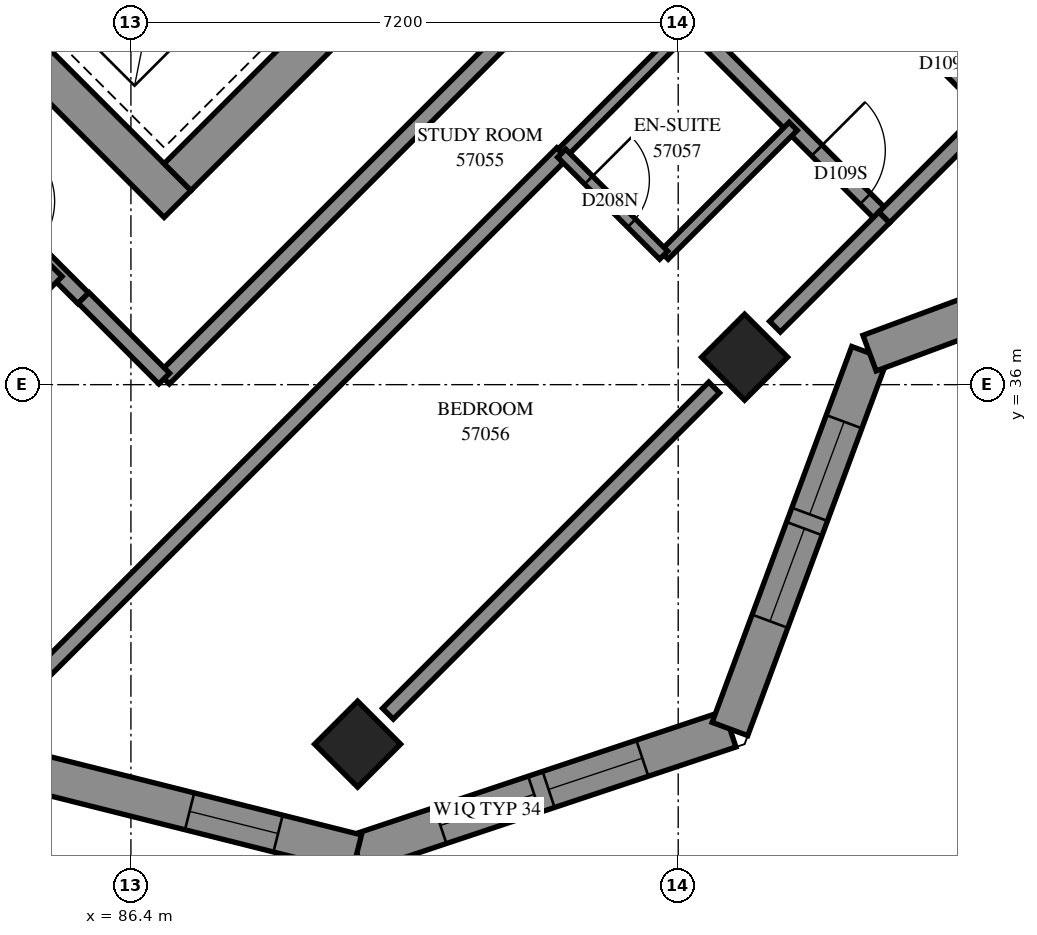
"""IFC4 building model, lengths in metres.
Left out: names, types, materials, properties, quantities, classifications, styles, units other than length and angle.
Written with IfcOpenShell. Run it as: python <this file> out.ifc"""

import sys

from ifc_helpers import new_model, si_unit, direction, frame, frame_2d, origin, origin_2d, place, context, subcontext, project, spatial, polyline, rectangle, outline, extrude, element, fill, save


model = new_model("IFC4")
c1 = context("Model", 3, precision=1e-05, world=origin(), true_north=direction((0.0, 1.0)))
c2 = subcontext(c1, "Body", "Model", "MODEL_VIEW")
j1 = project(units=[si_unit("LENGTHUNIT", "METRE"), si_unit("PLANEANGLEUNIT", "RADIAN")], contexts=[c1])
p1 = place(None, origin())
s1 = spatial("IfcSite", under=j1, at=p1, CompositionType="ELEMENT")
p2 = place(p1, origin())
s2 = spatial("IfcBuilding", under=s1, at=p2, CompositionType="ELEMENT")
p3 = place(p2, frame((0.0, 0.0, 210.0)))
s3 = spatial("IfcBuildingStorey", under=s2, at=p3, CompositionType="ELEMENT", Elevation=210.0)
for number, where, z_axis, x_axis in (
    (1, (94.474, 36.362, 0.0), (0.0, 0.0, 1.0), (0.707, -0.707, 0.0)),
    (2, (89.382, 31.271, 0.0), (0.0, 0.0, 1.0), (0.707, -0.707, 0.0)),
):
    element("IfcColumn", number, at=place(p3, frame(where, z_axis=z_axis, x_axis=x_axis)), inside=s3, PredefinedType="COLUMN", context=c2, shape_type="SweptSolid", body=[
        extrude(rectangle(XDim=0.8, YDim=0.8, at=origin_2d()), origin(), (0.0, 0.0, 1.0), 3.1),
    ])
p4 = place(p3, frame((76.124, 49.267, -0.3), z_axis=(0.0, 0.0, 1.0), x_axis=(0.7071067812, -0.7071067812, 0.0)))
e3 = element("IfcWall", 3, at=p4, inside=s3, PredefinedType="SHEAR", context=c2, shape_type="SweptSolid", body=[
    extrude(rectangle(XDim=15.4, YDim=0.5, at=frame_2d((7.7, 0.0))), origin(), (0.0, 0.0, 1.0), 2.7),
])
p5 = place(p3, frame((87.013, 38.731, -0.3), z_axis=(0.0, 0.0, 1.0), x_axis=(0.7071067812, 0.7071067812, 0.0)))
e4 = element("IfcWall", 4, at=p5, inside=s3, PredefinedType="SHEAR", context=c2, shape_type="SweptSolid", body=[
    extrude(rectangle(XDim=14.4, YDim=0.5, at=frame_2d((7.2, 0.0))), origin(), (0.0, 0.0, 1.0), 2.7),
])
p6 = place(p5, frame((4.55, 0.0, 0.3)))
e5 = element("IfcOpeningElement", 5, at=p6, cuts=e4, PredefinedType="OPENING", context=c2, shape_type="SweptSolid", body=[
    extrude(rectangle(XDim=1.1, YDim=2.1, at=frame_2d((0.55, 1.05))), frame((0.0, 0.26, 0.0), z_axis=(0.0, -1.0, 0.0), x_axis=(1.0, 0.0, 0.0)), (0.0, 0.0, 1.0), 0.52),
])
p7 = place(p5, frame((11.35, 0.0, 0.3)))
e6 = element("IfcOpeningElement", 6, at=p7, cuts=e4, PredefinedType="OPENING", context=c2, shape_type="SweptSolid", body=[
    extrude(rectangle(XDim=1.1, YDim=2.1, at=frame_2d((0.55, 1.05))), frame((0.0, 0.26, 0.0), z_axis=(0.0, -1.0, 0.0), x_axis=(1.0, 0.0, 0.0)), (0.0, 0.0, 1.0), 0.52),
])
p8 = place(p3, frame((89.373, 29.834, 0.0), z_axis=(0.0, 0.0, 1.0), x_axis=(0.9486832981, 0.316227766, 0.0)))
e7 = element("IfcWall", 7, at=p8, inside=s3, PredefinedType="SOLIDWALL", context=c2, shape_type="SweptSolid", body=[
    extrude(outline(polyline([(-0.073, -0.25), (5.294, -0.25), (5.054, 0.25), (0.073, 0.25), (-0.073, -0.25)])), origin(), (0.0, 0.0, 1.0), 3.1),
])
p9 = place(p8, frame((1.159, 0.0, 0.45)))
e8 = element("IfcOpeningElement", 8, at=p9, cuts=e7, PredefinedType="OPENING", context=c2, shape_type="SweptSolid", body=[
    extrude(rectangle(XDim=1.3, YDim=2.5, at=frame_2d((0.65, 1.25))), frame((0.0, 0.26, 0.0), z_axis=(0.0, -1.0, 0.0), x_axis=(1.0, 0.0, 0.0)), (0.0, 0.0, 1.0), 0.52),
])
p10 = place(p8, frame((2.659, 0.0, 0.45)))
e9 = element("IfcOpeningElement", 9, at=p10, cuts=e7, PredefinedType="OPENING", context=c2, shape_type="SweptSolid", body=[
    extrude(rectangle(XDim=1.3, YDim=2.5, at=frame_2d((0.65, 1.25))), frame((0.0, 0.26, 0.0), z_axis=(0.0, -1.0, 0.0), x_axis=(1.0, 0.0, 0.0)), (0.0, 0.0, 1.0), 0.52),
])
p11 = place(p3, frame((94.281, 31.47, 0.0), z_axis=(0.0, 0.0, 1.0), x_axis=(0.3481903374, 0.9374238577, 0.0)))
e10 = element("IfcWall", 10, at=p11, inside=s3, PredefinedType="SOLIDWALL", context=c2, shape_type="SweptSolid", body=[
    extrude(outline(polyline([(-0.12, -0.25), (5.16, -0.25), (5.39, 0.25), (0.12, 0.25), (-0.12, -0.25)])), origin(), (0.0, 0.0, 1.0), 3.1),
])
p12 = place(p11, frame((1.512, 0.0, 0.45)))
e11 = element("IfcOpeningElement", 11, at=p12, cuts=e10, PredefinedType="OPENING", context=c2, shape_type="SweptSolid", body=[
    extrude(rectangle(XDim=1.3, YDim=2.5, at=frame_2d((0.65, 1.25))), frame((0.0, 0.26, 0.0), z_axis=(0.0, -1.0, 0.0), x_axis=(1.0, 0.0, 0.0)), (0.0, 0.0, 1.0), 0.52),
])
p13 = place(p11, frame((3.012, 0.0, 0.45)))
e12 = element("IfcOpeningElement", 12, at=p13, cuts=e10, PredefinedType="OPENING", context=c2, shape_type="SweptSolid", body=[
    extrude(rectangle(XDim=1.3, YDim=2.5, at=frame_2d((0.65, 1.25))), frame((0.0, 0.26, 0.0), z_axis=(0.0, -1.0, 0.0), x_axis=(1.0, 0.0, 0.0)), (0.0, 0.0, 1.0), 0.52),
])
p14 = place(p3, frame((96.118, 36.415, 0.0), z_axis=(0.0, 0.0, 1.0), x_axis=(0.9374238577, 0.3481903374, 0.0)))
e13 = element("IfcWall", 13, at=p14, inside=s3, PredefinedType="SOLIDWALL", context=c2, shape_type="SweptSolid", body=[
    extrude(outline(polyline([(0.115, -0.25), (5.395, -0.25), (5.155, 0.25), (-0.115, 0.25), (0.115, -0.25)])), origin(), (0.0, 0.0, 1.0), 3.1),
])
p15 = place(p14, frame((1.655, 0.0, 0.45)))
e14 = element("IfcOpeningElement", 14, at=p15, cuts=e13, PredefinedType="OPENING", context=c2, shape_type="SweptSolid", body=[
    extrude(rectangle(XDim=1.3, YDim=2.5, at=frame_2d((0.65, 1.25))), frame((0.0, 0.26, 0.0), z_axis=(0.0, -1.0, 0.0), x_axis=(1.0, 0.0, 0.0)), (0.0, 0.0, 1.0), 0.52),
])
p16 = place(p14, frame((3.155, 0.0, 0.45)))
e15 = element("IfcOpeningElement", 15, at=p16, cuts=e13, PredefinedType="OPENING", context=c2, shape_type="SweptSolid", body=[
    extrude(rectangle(XDim=1.3, YDim=2.5, at=frame_2d((0.65, 1.25))), frame((0.0, 0.26, 0.0), z_axis=(0.0, -1.0, 0.0), x_axis=(1.0, 0.0, 0.0)), (0.0, 0.0, 1.0), 0.52),
])
p17 = place(p3, frame((85.049, 30.92, 0.0), z_axis=(0.0, 0.0, 1.0), x_axis=(0.9698501821, -0.2437019169, 0.0)))
e16 = element("IfcWall", 16, at=p17, inside=s3, PredefinedType="SOLIDWALL", context=c2, shape_type="SweptSolid", body=[
    extrude(outline(polyline([(-0.143, -0.25), (4.531, -0.25), (4.385, 0.25), (0.143, 0.25), (-0.143, -0.25)])), origin(), (0.0, 0.0, 1.0), 3.1),
])
p18 = place(p17, frame((2.189, 0.0, 0.45)))
e17 = element("IfcOpeningElement", 17, at=p18, cuts=e16, PredefinedType="OPENING", context=c2, shape_type="SweptSolid", body=[
    extrude(rectangle(XDim=1.2, YDim=2.5, at=frame_2d((0.6, 1.25))), frame((0.0, 0.26, 0.0), z_axis=(0.0, -1.0, 0.0), x_axis=(1.0, 0.0, 0.0)), (0.0, 0.0, 1.0), 0.52),
])
p19 = place(p3, frame((85.002, 31.976, 0.0), z_axis=(0.0, 0.0, 1.0), x_axis=(0.7072267874, 0.7069867546, 0.0)))
e18 = element("IfcWall", 18, at=p19, inside=s3, PredefinedType="PARTITIONING", context=c2, shape_type="SweptSolid", body=[
    extrude(rectangle(XDim=9.999, YDim=0.2, at=frame_2d((4.999, 0.0))), origin(), (0.0, 0.0, 1.0), 3.1),
])
p20 = place(p3, frame((86.835, 36.079, 0.0), z_axis=(0.0, 0.0, 1.0), x_axis=(0.7071067812, 0.7071067812, 0.0)))
e19 = element("IfcWall", 19, at=p20, inside=s3, PredefinedType="PARTITIONING", context=c2, shape_type="SweptSolid", body=[
    extrude(rectangle(XDim=8.2, YDim=0.2, at=frame_2d((4.1, 0.0))), origin(), (0.0, 0.0, 1.0), 3.1),
])
p21 = place(p3, frame((80.849, 42.061, 0.0), z_axis=(0.0, 0.0, 1.0), x_axis=(0.7071067812, -0.7071067812, 0.0)))
e20 = element("IfcWall", 20, at=p21, inside=s3, PredefinedType="PARTITIONING", context=c2, shape_type="SweptSolid", body=[
    extrude(rectangle(XDim=6.964, YDim=0.2, at=frame_2d((3.482, 0.0))), origin(), (0.0, 0.0, 1.0), 3.1),
])
p22 = place(p21, frame((5.159, 0.0, 0.0)))
e21 = element("IfcOpeningElement", 21, at=p22, cuts=e20, PredefinedType="OPENING", context=c2, shape_type="SweptSolid", body=[
    extrude(rectangle(XDim=0.9, YDim=2.1, at=frame_2d((0.45, 1.05))), frame((0.0, 0.11, 0.0), z_axis=(0.0, -1.0, 0.0), x_axis=(1.0, 0.0, 0.0)), (0.0, 0.0, 1.0), 0.22),
])
p23 = place(p3, frame((89.781, 31.671, 0.0), z_axis=(0.0, 0.0, 1.0), x_axis=(0.7071067812, 0.7071067812, 0.0)))
e22 = element("IfcWall", 22, at=p23, inside=s3, PredefinedType="PARTITIONING", context=c2, shape_type="SweptSolid", body=[
    extrude(rectangle(XDim=6.07, YDim=0.2, at=frame_2d((3.035, 0.0))), origin(), (0.0, 0.0, 1.0), 2.6),
])
p24 = place(p3, frame((94.047, 43.287, 0.0), z_axis=(0.0, 0.0, 1.0), x_axis=(0.7071067812, -0.7071067812, 0.0)))
e23 = element("IfcWall", 23, at=p24, inside=s3, PredefinedType="PARTITIONING", context=c2, shape_type="SweptSolid", body=[
    extrude(rectangle(XDim=5.199, YDim=0.2, at=frame_2d((2.599, 0.0))), origin(), (0.0, 0.0, 1.0), 3.1),
])
p25 = place(p24, frame((3.898, 0.0, 0.0)))
e24 = element("IfcOpeningElement", 24, at=p25, cuts=e23, PredefinedType="OPENING", context=c2, shape_type="SweptSolid", body=[
    extrude(rectangle(XDim=0.9, YDim=2.1, at=frame_2d((0.45, 1.05))), frame((0.0, 0.11, 0.0), z_axis=(0.0, -1.0, 0.0), x_axis=(1.0, 0.0, 0.0)), (0.0, 0.0, 1.0), 0.22),
])
p26 = place(p3, frame((92.633, 41.873, 0.0), z_axis=(0.0, 0.0, 1.0), x_axis=(0.7071067812, -0.7071067812, 0.0)))
e25 = element("IfcWall", 25, at=p26, inside=s3, PredefinedType="PARTITIONING", context=c2, shape_type="SweptSolid", body=[
    extrude(rectangle(XDim=5.199, YDim=0.2, at=frame_2d((2.599, 0.0))), origin(), (0.0, 0.0, 1.0), 3.1),
])
p27 = place(p26, frame((0.253, 0.0, 0.0)))
e26 = element("IfcOpeningElement", 26, at=p27, cuts=e25, PredefinedType="OPENING", context=c2, shape_type="SweptSolid", body=[
    extrude(rectangle(XDim=1.0, YDim=2.1, at=frame_2d((0.5, 1.05))), frame((0.0, 0.11, 0.0), z_axis=(0.0, -1.0, 0.0), x_axis=(1.0, 0.0, 0.0)), (0.0, 0.0, 1.0), 0.22),
])
p28 = place(p26, frame((3.948, 0.0, 0.0)))
e27 = element("IfcOpeningElement", 27, at=p28, cuts=e25, PredefinedType="OPENING", context=c2, shape_type="SweptSolid", body=[
    extrude(rectangle(XDim=0.9, YDim=2.1, at=frame_2d((0.45, 1.05))), frame((0.0, 0.11, 0.0), z_axis=(0.0, -1.0, 0.0), x_axis=(1.0, 0.0, 0.0)), (0.0, 0.0, 1.0), 0.22),
])
for number, where, z_axis, x_axis in (
    (28, (92.072, 39.046, 0.0), (0.0, 0.0, 1.0), (0.707, 0.708, 0.0)),
    (29, (93.415, 37.703, 0.0), (0.0, 0.0, 1.0), (0.708, 0.707, 0.0)),
):
    element("IfcWall", number, at=place(p3, frame(where, z_axis=z_axis, x_axis=x_axis)), inside=s3, PredefinedType="PARTITIONING", context=c2, shape_type="SweptSolid", body=[
        extrude(rectangle(XDim=2.4, YDim=0.15, at=frame_2d((1.2, 0.0))), origin(), (0.0, 0.0, 1.0), 3.1),
    ])
p29 = place(p3, frame((94.873, 36.763, 0.0), z_axis=(0.0, 0.0, 1.0), x_axis=(0.7071067812, 0.7071067812, 0.0)))
e30 = element("IfcWall", 30, at=p29, inside=s3, PredefinedType="PARTITIONING", context=c2, shape_type="SweptSolid", body=[
    extrude(rectangle(XDim=2.034, YDim=0.2, at=frame_2d((1.017, 0.0))), origin(), (0.0, 0.0, 1.0), 2.6),
])
p30 = place(p3, frame((96.311, 38.201, 0.0), z_axis=(0.0, 0.0, 1.0), x_axis=(0.7071067812, 0.7071067812, 0.0)))
e31 = element("IfcWall", 31, at=p30, inside=s3, PredefinedType="PARTITIONING", context=c2, shape_type="SweptSolid", body=[
    extrude(rectangle(XDim=2.0, YDim=0.2, at=frame_2d((1.0, 0.0))), origin(), (0.0, 0.0, 1.0), 2.6),
])
p31 = place(p3, frame((92.067, 39.045, 0.0), z_axis=(0.0, 0.0, 1.0), x_axis=(0.7071067812, -0.7071067812, 0.0)))
e32 = element("IfcWall", 32, at=p31, inside=s3, PredefinedType="PARTITIONING", context=c2, shape_type="SweptSolid", body=[
    extrude(rectangle(XDim=1.898, YDim=0.15, at=frame_2d((0.949, 0.0))), origin(), (0.0, 0.0, 1.0), 3.1),
])
p32 = place(p31, frame((0.501, 0.0, 0.0)))
e33 = element("IfcOpeningElement", 33, at=p32, cuts=e32, PredefinedType="OPENING", context=c2, shape_type="SweptSolid", body=[
    extrude(rectangle(XDim=0.8, YDim=2.1, at=frame_2d((0.4, 1.05))), frame((0.0, 0.085, 0.0), z_axis=(0.0, -1.0, 0.0), x_axis=(1.0, 0.0, 0.0)), (0.0, 0.0, 1.0), 0.17),
])
p33 = place(p3, frame((85.778, 37.142, 0.0), z_axis=(0.0, 0.0, 1.0), x_axis=(0.7064400143, -0.70777292, 0.0)))
e34 = element("IfcWall", 34, at=p33, inside=s3, PredefinedType="PARTITIONING", context=c2, shape_type="SweptSolid", body=[
    extrude(rectangle(XDim=1.5, YDim=0.2, at=frame_2d((0.75, 0.0))), origin(), (0.0, 0.0, 1.0), 3.1),
])
p34 = place(p3, frame((84.693, 36.761, 0.0), z_axis=(0.0, 0.0, 1.0), x_axis=(0.7061388061, 0.708073433, 0.0)))
e35 = element("IfcWall", 35, at=p34, inside=s3, PredefinedType="PARTITIONING", context=c2, shape_type="SweptSolid", body=[
    extrude(rectangle(XDim=1.034, YDim=0.2, at=frame_2d((0.517, 0.0))), origin(), (0.0, 0.0, 1.0), 3.1),
])
p35 = place(p9, origin())
e36 = element("IfcWindow", 36, at=p35, inside=s3, PartitioningType="SINGLE_PANEL", PredefinedType="WINDOW", context=c2, shape_type="SweptSolid", body=[
    extrude(rectangle(XDim=1.3, YDim=2.5, at=frame_2d((0.65, 1.25))), frame((0.0, 0.18, 0.0), z_axis=(0.0, -1.0, 0.0), x_axis=(1.0, 0.0, 0.0)), (0.0, 0.0, 1.0), 0.06),
])
fill(e8, e36)
p36 = place(p10, origin())
e37 = element("IfcWindow", 37, at=p36, inside=s3, PartitioningType="SINGLE_PANEL", PredefinedType="WINDOW", context=c2, shape_type="SweptSolid", body=[
    extrude(rectangle(XDim=1.3, YDim=2.5, at=frame_2d((0.65, 1.25))), frame((0.0, 0.18, 0.0), z_axis=(0.0, -1.0, 0.0), x_axis=(1.0, 0.0, 0.0)), (0.0, 0.0, 1.0), 0.06),
])
fill(e9, e37)
p37 = place(p12, origin())
e38 = element("IfcWindow", 38, at=p37, inside=s3, PartitioningType="SINGLE_PANEL", PredefinedType="WINDOW", context=c2, shape_type="SweptSolid", body=[
    extrude(rectangle(XDim=1.3, YDim=2.5, at=frame_2d((0.65, 1.25))), frame((0.0, 0.18, 0.0), z_axis=(0.0, -1.0, 0.0), x_axis=(1.0, 0.0, 0.0)), (0.0, 0.0, 1.0), 0.06),
])
fill(e11, e38)
p38 = place(p13, origin())
e39 = element("IfcWindow", 39, at=p38, inside=s3, PartitioningType="SINGLE_PANEL", PredefinedType="WINDOW", context=c2, shape_type="SweptSolid", body=[
    extrude(rectangle(XDim=1.3, YDim=2.5, at=frame_2d((0.65, 1.25))), frame((0.0, 0.18, 0.0), z_axis=(0.0, -1.0, 0.0), x_axis=(1.0, 0.0, 0.0)), (0.0, 0.0, 1.0), 0.06),
])
fill(e12, e39)
p39 = place(p18, origin())
e40 = element("IfcWindow", 40, at=p39, inside=s3, PartitioningType="SINGLE_PANEL", PredefinedType="WINDOW", context=c2, shape_type="SweptSolid", body=[
    extrude(rectangle(XDim=1.2, YDim=2.5, at=frame_2d((0.6, 1.25))), frame((0.0, 0.18, 0.0), z_axis=(0.0, -1.0, 0.0), x_axis=(1.0, 0.0, 0.0)), (0.0, 0.0, 1.0), 0.06),
])
fill(e17, e40)
p40 = place(p28, origin())
e41 = element("IfcDoor", 41, at=p40, inside=s3, OperationType="SINGLE_SWING_LEFT", PredefinedType="DOOR", context=c2, shape_type="SweptSolid", body=[
    extrude(rectangle(XDim=0.9, YDim=2.1, at=frame_2d((0.45, 1.05))), frame((0.0, 0.025, 0.0), z_axis=(0.0, -1.0, 0.0), x_axis=(1.0, 0.0, 0.0)), (0.0, 0.0, 1.0), 0.05),
])
fill(e27, e41)
p41 = place(p32, origin())
e42 = element("IfcDoor", 42, at=p41, inside=s3, OperationType="SINGLE_SWING_RIGHT", PredefinedType="DOOR", context=c2, shape_type="SweptSolid", body=[
    extrude(rectangle(XDim=0.8, YDim=2.1, at=frame_2d((0.4, 1.05))), frame((0.0, 0.025, 0.0), z_axis=(0.0, -1.0, 0.0), x_axis=(1.0, 0.0, 0.0)), (0.0, 0.0, 1.0), 0.05),
])
fill(e33, e42)
p42 = place(p25, origin())
e43 = element("IfcDoor", 43, at=p42, inside=s3, OperationType="SINGLE_SWING_RIGHT", PredefinedType="DOOR", context=c2, shape_type="SweptSolid", body=[
    extrude(rectangle(XDim=0.9, YDim=2.1, at=frame_2d((0.45, 1.05))), frame((0.0, 0.025, 0.0), z_axis=(0.0, -1.0, 0.0), x_axis=(1.0, 0.0, 0.0)), (0.0, 0.0, 1.0), 0.05),
])
fill(e24, e43)
save(model, sys.argv[1])
